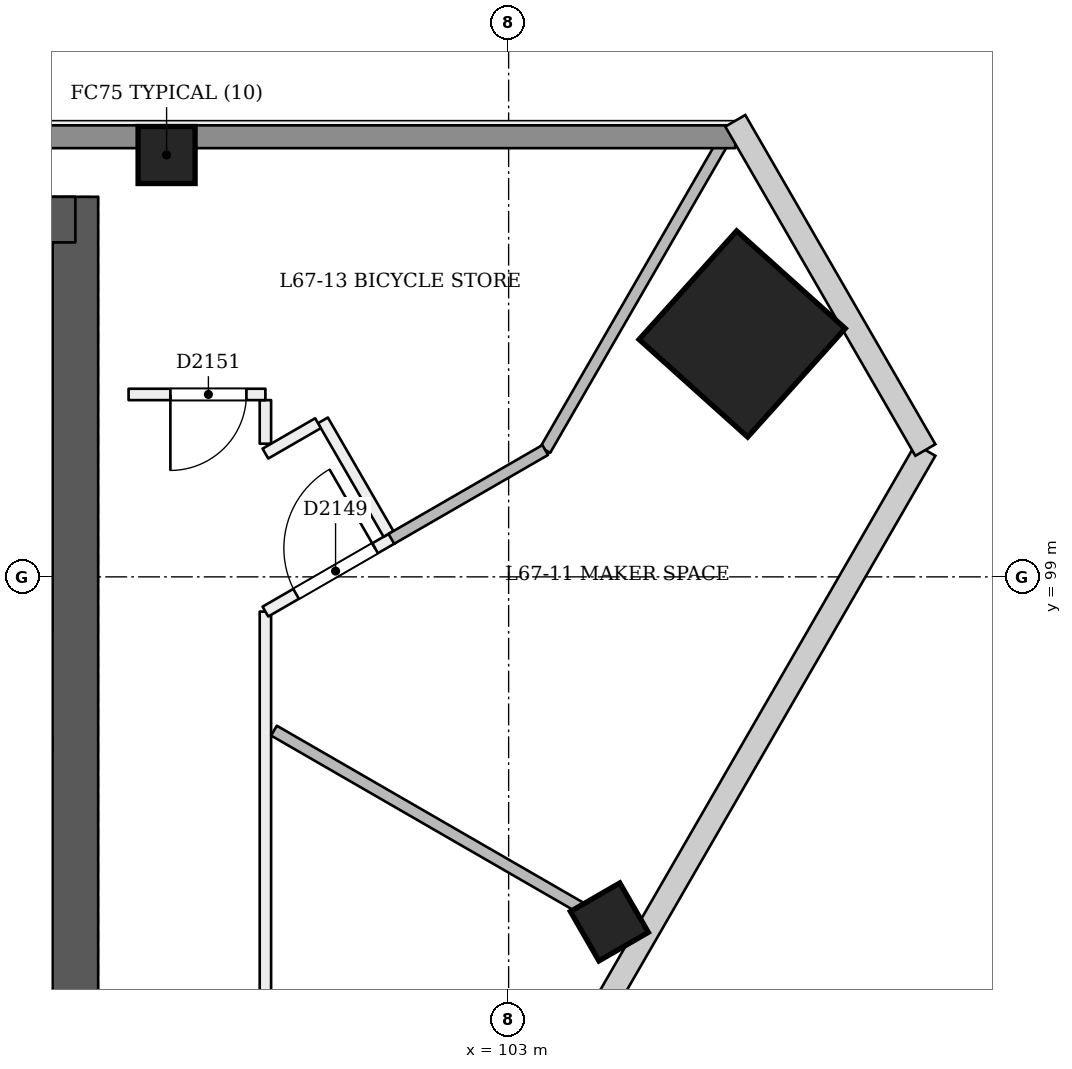
"""IFC4 building model, lengths in metres.
Left out: names, types, materials, properties, quantities, classifications, styles, units other than length and angle.
Written with IfcOpenShell. Run it as: python <this file> out.ifc"""

import sys

from ifc_helpers import new_model, si_unit, direction, frame, frame_2d, origin, origin_2d, place, context, subcontext, project, spatial, rectangle, extrude, element, fill, save


model = new_model("IFC4")
c1 = context("Model", 3, precision=1e-05, world=origin(), true_north=direction((0.0, 1.0)))
c2 = subcontext(c1, "Body", "Model", "MODEL_VIEW")
j1 = project(units=[si_unit("LENGTHUNIT", "METRE"), si_unit("PLANEANGLEUNIT", "RADIAN")], contexts=[c1])
p1 = place(None, origin())
s1 = spatial("IfcSite", under=j1, at=p1, CompositionType="ELEMENT")
p2 = place(p1, origin())
s2 = spatial("IfcBuilding", under=s1, at=p2, CompositionType="ELEMENT")
p3 = place(p2, frame((0.0, 0.0, 260.8)))
s3 = spatial("IfcBuildingStorey", under=s2, at=p3, CompositionType="ELEMENT", Elevation=260.8)
p4 = place(p3, frame((97.3, 93.1, 0.0), z_axis=(0.0, 0.0, 1.0), x_axis=(0.0, 1.0, 0.0)))
e1 = element("IfcWall", 1, at=p4, inside=s3, PredefinedType="SHEAR", context=c2, shape_type="SweptSolid", body=[
    extrude(rectangle(XDim=10.9, YDim=0.6, at=frame_2d((5.45, 0.0))), origin(), (0.0, 0.0, 1.0), 3.6),
])
p5 = place(p3, frame((97.3, 103.7, 0.0), z_axis=(0.0, 0.0, 1.0), x_axis=(-1.0, 0.0, 0.0)))
e2 = element("IfcWall", 2, at=p5, inside=s3, PredefinedType="SHEAR", context=c2, shape_type="SweptSolid", body=[
    extrude(rectangle(XDim=24.9, YDim=0.6, at=frame_2d((12.45, 0.0))), origin(), (0.0, 0.0, 1.0), 3.6),
])
p6 = place(p3, frame((106.106, 102.184, 0.0), z_axis=(-0.028335986449, 0.009287153453, 0.999555311452), x_axis=(0.498283105517, -0.866730669529, 0.022178666655)))
e3 = element("IfcColumn", 3, at=p6, inside=s3, PredefinedType="COLUMN", context=c2, shape_type="SweptSolid", body=[
    extrude(rectangle(XDim=1.92, YDim=1.92, at=origin_2d()), origin(), (0.0, 0.0, 1.0), 3.602),
])
p7 = place(p3, frame((98.5, 104.55, 0.0), z_axis=(0.0, 0.0, 1.0), x_axis=(1.0, 0.0, 0.0)))
e4 = element("IfcColumn", 4, at=p7, inside=s3, PredefinedType="COLUMN", context=c2, shape_type="SweptSolid", body=[
    extrude(rectangle(XDim=0.75, YDim=0.75, at=origin_2d()), origin(), (0.0, 0.0, 1.0), 3.6),
])
p8 = place(p3, frame((104.353, 94.413, -0.023), z_axis=(-0.022222910879, 0.038415824599, 0.999014697916), x_axis=(-0.499512989381, -0.866022152755, 0.02219018651)))
e5 = element("IfcColumn", 5, at=p8, inside=s3, PredefinedType="COLUMN", context=c2, shape_type="SweptSolid", body=[
    extrude(rectangle(XDim=0.75, YDim=0.75, at=origin_2d()), origin(), (0.0, 0.0, 1.0), 3.604),
])
p9 = place(p3, frame((99.8, 90.6, 0.0), z_axis=(0.0, 0.0, 1.0), x_axis=(0.0, 1.0, 0.0)))
e6 = element("IfcWall", 6, at=p9, inside=s3, PredefinedType="PARTITIONING", context=c2, shape_type="SweptSolid", body=[
    extrude(rectangle(XDim=7.943, YDim=0.15, at=frame_2d((3.972, 0.0))), origin(), (0.0, 0.0, 1.0), 3.2),
])
p10 = place(p9, frame((0.269, 0.0, 0.0)))
e7 = element("IfcOpeningElement", 7, at=p10, cuts=e6, PredefinedType="OPENING", context=c2, shape_type="SweptSolid", body=[
    extrude(rectangle(XDim=1.2, YDim=2.1, at=frame_2d((0.6, 1.05))), frame((0.0, 0.085, 0.0), z_axis=(0.0, -1.0, 0.0), x_axis=(1.0, 0.0, 0.0)), (0.0, 0.0, 1.0), 0.171),
])
p11 = place(p3, frame((99.8, 98.543, 0.0), z_axis=(0.0, 0.0, 1.0), x_axis=(0.865996321171, 0.50005036918, 0.0)))
e8 = element("IfcWall", 8, at=p11, inside=s3, PredefinedType="PARTITIONING", context=c2, shape_type="SweptSolid", body=[
    extrude(rectangle(XDim=1.933, YDim=0.15, at=frame_2d((0.967, 0.0))), origin(), (0.0, 0.0, 1.0), 3.2),
])
p12 = place(p11, frame((0.466, 0.0, 0.0)))
e9 = element("IfcOpeningElement", 9, at=p12, cuts=e8, PredefinedType="OPENING", context=c2, shape_type="SweptSolid", body=[
    extrude(rectangle(XDim=1.2, YDim=2.1, at=frame_2d((0.6, 1.05))), frame((0.0, 0.085, 0.0), z_axis=(0.0, -1.0, 0.0), x_axis=(1.0, 0.0, 0.0)), (0.0, 0.0, 1.0), 0.171),
])
p13 = place(p3, frame((101.419, 99.565, 0.0), z_axis=(0.0, 0.0, 1.0), x_axis=(-0.499914405916, 0.866074815912, 0.0)))
e10 = element("IfcWall", 10, at=p13, inside=s3, PredefinedType="PARTITIONING", context=c2, shape_type="SweptSolid", body=[
    extrude(rectangle(XDim=1.725, YDim=0.15, at=frame_2d((0.862, 0.0))), origin(), (0.0, 0.0, 1.0), 3.2),
])
p14 = place(p3, frame((100.492, 101.021, 0.0), z_axis=(0.0, 0.0, 1.0), x_axis=(-0.86612963205, -0.499819427878, 0.0)))
e11 = element("IfcWall", 11, at=p14, inside=s3, PredefinedType="PARTITIONING", context=c2, shape_type="SweptSolid", body=[
    extrude(rectangle(XDim=0.799, YDim=0.15, at=frame_2d((0.399, 0.0))), origin(), (0.0, 0.0, 1.0), 3.2),
])
p15 = place(p3, frame((99.8, 100.752, 0.0), z_axis=(0.0, 0.0, 1.0), x_axis=(0.0, 1.0, 0.0)))
e12 = element("IfcWall", 12, at=p15, inside=s3, PredefinedType="PARTITIONING", context=c2, shape_type="SweptSolid", body=[
    extrude(rectangle(XDim=0.573, YDim=0.15, at=frame_2d((0.287, 0.0))), origin(), (0.0, 0.0, 1.0), 3.2),
])
p16 = place(p3, frame((99.8, 101.4, 0.0), z_axis=(0.0, 0.0, 1.0), x_axis=(-1.0, 0.0, 0.0)))
e13 = element("IfcWall", 13, at=p16, inside=s3, PredefinedType="PARTITIONING", context=c2, shape_type="SweptSolid", body=[
    extrude(rectangle(XDim=1.8, YDim=0.15, at=frame_2d((0.9, 0.0))), origin(), (0.0, 0.0, 1.0), 3.2),
])
p17 = place(p16, frame((0.25, 0.0, 0.0)))
e14 = element("IfcOpeningElement", 14, at=p17, cuts=e13, PredefinedType="OPENING", context=c2, shape_type="SweptSolid", body=[
    extrude(rectangle(XDim=1.0, YDim=2.1, at=frame_2d((0.5, 1.05))), frame((0.0, 0.085, 0.0), z_axis=(0.0, -1.0, 0.0), x_axis=(1.0, 0.0, 0.0)), (0.0, 0.0, 1.0), 0.171),
])
p18 = place(p3, frame((104.655, 94.239, 0.0), z_axis=(0.0, 0.0, 1.0), x_axis=(-0.866025963225, 0.49999903102, 0.0)))
e15 = element("IfcWall", 15, at=p18, inside=s3, PredefinedType="PARTITIONING", context=c2, shape_type="SweptSolid", body=[
    extrude(rectangle(XDim=5.476, YDim=0.15, at=frame_2d((2.738, 0.0))), origin(), (0.0, 0.0, 1.0), 2.7),
])
p19 = place(p3, frame((105.924, 104.9, 0.0), z_axis=(0.0, 0.0, 1.0), x_axis=(-0.499997844476, -0.866026648273, 0.0)))
e16 = element("IfcWall", 16, at=p19, inside=s3, PredefinedType="PARTITIONING", context=c2, shape_type="SweptSolid", body=[
    extrude(rectangle(XDim=4.886, YDim=0.15, at=frame_2d((2.443, 0.0))), origin(), (0.0, 0.0, 1.0), 2.7),
])
p20 = place(p3, frame((103.481, 100.669, 0.0), z_axis=(0.0, 0.0, 1.0), x_axis=(-0.866042970182, -0.499969572873, 0.0)))
e17 = element("IfcWall", 17, at=p20, inside=s3, PredefinedType="PARTITIONING", context=c2, shape_type="SweptSolid", body=[
    extrude(rectangle(XDim=2.338, YDim=0.15, at=frame_2d((1.169, 0.0))), origin(), (0.0, 0.0, 1.0), 3.2),
])
p21 = place(p3, frame((64.018, 104.79, 0.0), z_axis=(0.0, 0.0, 1.0), x_axis=(1.0, 0.0, 0.0)))
e18 = element("IfcWall", 18, at=p21, inside=s3, PredefinedType="SOLIDWALL", context=c2, shape_type="SweptSolid", body=[
    extrude(rectangle(XDim=41.964, YDim=0.3, at=frame_2d((20.982, 0.0))), origin(), (0.0, 0.0, 1.0), 2.7),
])
p22 = place(p12, origin())
e19 = element("IfcDoor", 19, at=p22, inside=s3, OperationType="SINGLE_SWING_RIGHT", PredefinedType="NOTDEFINED", context=c2, shape_type="SweptSolid", body=[
    extrude(rectangle(XDim=1.2, YDim=2.1, at=frame_2d((0.6, 1.05))), frame((0.0, 0.025, 0.0), z_axis=(0.0, -1.0, 0.0), x_axis=(1.0, 0.0, 0.0)), (0.0, 0.0, 1.0), 0.05),
])
fill(e9, e19)
p23 = place(p17, origin())
e20 = element("IfcDoor", 20, at=p23, inside=s3, OperationType="SINGLE_SWING_RIGHT", PredefinedType="NOTDEFINED", context=c2, shape_type="SweptSolid", body=[
    extrude(rectangle(XDim=1.0, YDim=2.1, at=frame_2d((0.5, 1.05))), frame((0.0, 0.025, 0.0), z_axis=(0.0, -1.0, 0.0), x_axis=(1.0, 0.0, 0.0)), (0.0, 0.0, 1.0), 0.05),
])
fill(e14, e20)
save(model, sys.argv[1])
